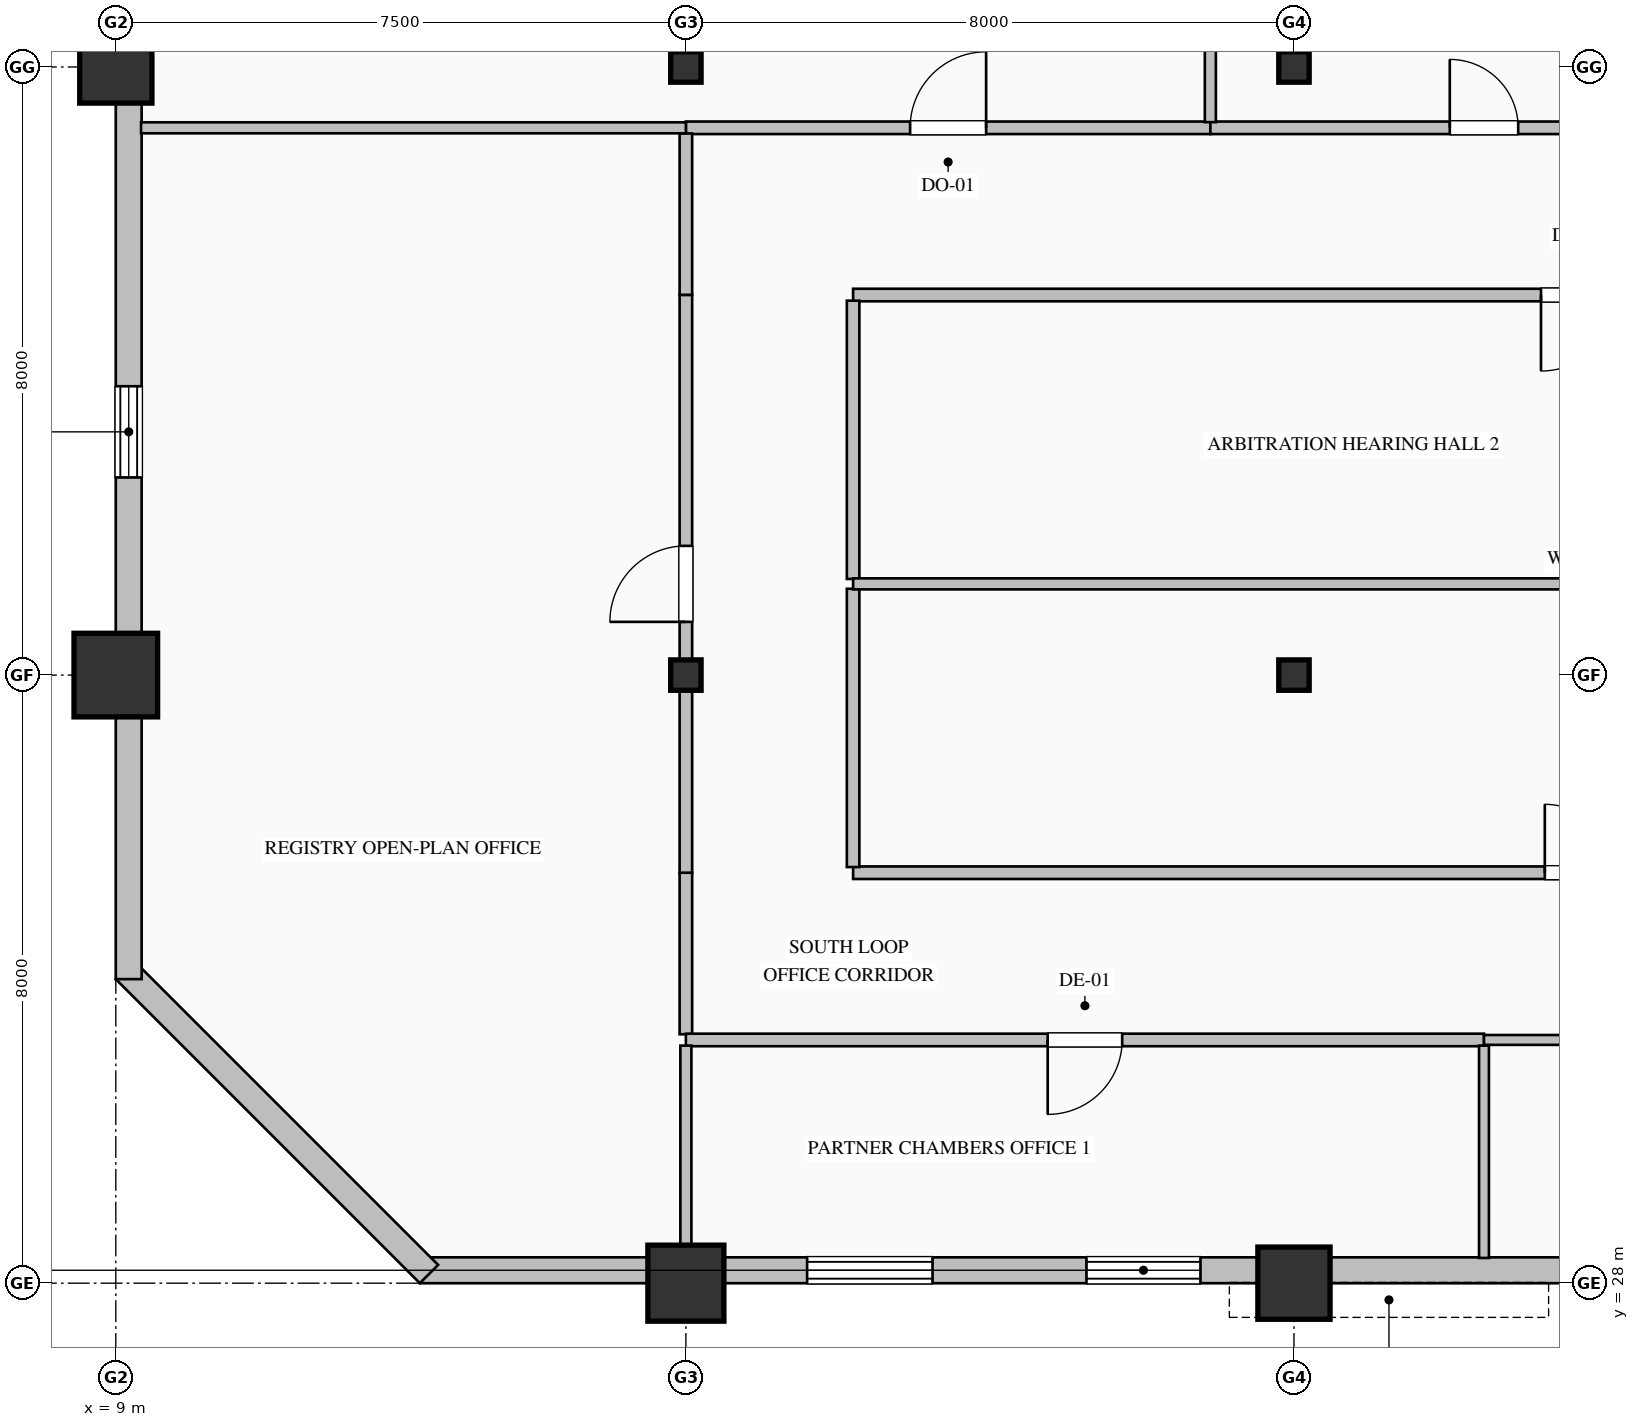
"""IFC4 building model, lengths in metres.
Left out: names, types, materials, properties, quantities, classifications, styles, units other than length and angle.
Written with IfcOpenShell. Run it as: python <this file> out.ifc"""

import sys

from ifc_helpers import new_model, si_unit, direction, frame, frame_2d, origin, origin_2d, place, context, subcontext, project, spatial, rectangle, hollow_rectangle, hollow_circle, i_section, extrude, element, fill, save


model = new_model("IFC4")
c1 = context("Model", 3, precision=1e-05, world=origin(), true_north=direction((0.0, 1.0)))
c2 = subcontext(c1, "Body", "Model", "MODEL_VIEW")
j1 = project(units=[si_unit("LENGTHUNIT", "METRE"), si_unit("PLANEANGLEUNIT", "RADIAN")], contexts=[c1])
p1 = place(None, origin())
s1 = spatial("IfcSite", under=j1, at=p1, CompositionType="ELEMENT")
p2 = place(p1, origin())
s2 = spatial("IfcBuilding", under=s1, at=p2, CompositionType="ELEMENT")
p3 = place(p2, frame((0.0, 0.0, 191.0)))
s3 = spatial("IfcBuildingStorey", under=s2, at=p3, CompositionType="ELEMENT", Elevation=191.0)
p4 = place(p3, frame((9.0, 36.0, 0.0), z_axis=(0.0, 0.0, 1.0), x_axis=(1.0, 0.0, 0.0)))
e1 = element("IfcColumn", 1, at=p4, inside=s3, PredefinedType="COLUMN", context=c2, shape_type="SweptSolid", body=[
    extrude(hollow_rectangle(XDim=1.1, YDim=1.1, WallThickness=0.04, at=origin_2d()), origin(), (0.0, 0.0, 1.0), 4.0),
])
p5 = place(p3, frame((9.0, 44.0, 0.0), z_axis=(0.0, 0.0, 1.0), x_axis=(1.0, 0.0, 0.0)))
e2 = element("IfcColumn", 2, at=p5, inside=s3, PredefinedType="COLUMN", context=c2, shape_type="SweptSolid", body=[
    extrude(hollow_rectangle(XDim=0.95, YDim=0.95, WallThickness=0.036, at=origin_2d()), origin(), (0.0, 0.0, 1.0), 4.0),
])
p6 = place(p3, frame((16.5, 28.0, 0.0), z_axis=(0.0, 0.0, 1.0), x_axis=(1.0, 0.0, 0.0)))
e3 = element("IfcColumn", 3, at=p6, inside=s3, PredefinedType="COLUMN", context=c2, shape_type="SweptSolid", body=[
    extrude(hollow_circle(Radius=0.5, WallThickness=0.036, at=origin_2d()), origin(), (0.0, 0.0, 1.0), 4.0),
])
for number, where, z_axis, x_axis in (
    (4, (16.5, 36.0, 0.0), (0.0, 0.0, 1.0), (1.0, 0.0, 0.0)),
    (5, (16.5, 44.0, 0.0), (0.0, 0.0, 1.0), (1.0, 0.0, 0.0)),
):
    element("IfcColumn", number, at=place(p3, frame(where, z_axis=z_axis, x_axis=x_axis)), inside=s3, PredefinedType="COLUMN", context=c2, shape_type="SweptSolid", body=[
        extrude(i_section(OverallWidth=0.4, OverallDepth=0.4, WebThickness=0.013, FlangeThickness=0.021, FilletRadius=0.022, at=origin_2d()), origin(), (0.0, 0.0, 1.0), 4.0),
    ])
p7 = place(p3, frame((24.5, 28.0, 0.0), z_axis=(0.0, 0.0, 1.0), x_axis=(1.0, 0.0, 0.0)))
e6 = element("IfcColumn", 6, at=p7, inside=s3, PredefinedType="COLUMN", context=c2, shape_type="SweptSolid", body=[
    extrude(hollow_rectangle(XDim=0.95, YDim=0.95, WallThickness=0.036, at=origin_2d()), origin(), (0.0, 0.0, 1.0), 4.0),
])
for number, where, z_axis, x_axis in (
    (7, (24.5, 36.0, 0.0), (0.0, 0.0, 1.0), (1.0, 0.0, 0.0)),
    (8, (24.5, 44.0, 0.0), (0.0, 0.0, 1.0), (1.0, 0.0, 0.0)),
):
    element("IfcColumn", number, at=place(p3, frame(where, z_axis=z_axis, x_axis=x_axis)), inside=s3, PredefinedType="COLUMN", context=c2, shape_type="SweptSolid", body=[
        extrude(i_section(OverallWidth=0.4, OverallDepth=0.4, WebThickness=0.013, FlangeThickness=0.021, FilletRadius=0.022, at=origin_2d()), origin(), (0.0, 0.0, 1.0), 4.0),
    ])
p8 = place(p3, frame((40.52, 28.17, 0.0), z_axis=(0.0, 0.0, 1.0), x_axis=(-1.0, 0.0, 0.0)))
e9 = element("IfcWall", 9, at=p8, inside=s3, PredefinedType="SOLIDWALL", context=c2, shape_type="SweptSolid", body=[
    extrude(rectangle(XDim=27.52, YDim=0.34, at=frame_2d((13.76, 0.0))), origin(), (0.0, 0.0, 1.0), 3.05),
])
p9 = place(p8, frame((9.975, 0.0, 0.85)))
e10 = element("IfcOpeningElement", 10, at=p9, cuts=e9, PredefinedType="OPENING", context=c2, shape_type="SweptSolid", body=[
    extrude(rectangle(XDim=1.65, YDim=1.95, at=frame_2d((0.825, 0.975))), frame((0.0, 0.18, 0.0), z_axis=(0.0, -1.0, 0.0), x_axis=(1.0, 0.0, 0.0)), (0.0, 0.0, 1.0), 0.36),
])
p10 = place(p8, frame((17.25, 0.0, 0.85)))
e11 = element("IfcOpeningElement", 11, at=p10, cuts=e9, PredefinedType="OPENING", context=c2, shape_type="SweptSolid", body=[
    extrude(rectangle(XDim=1.5, YDim=1.95, at=frame_2d((0.75, 0.975))), frame((0.0, 0.18, 0.0), z_axis=(0.0, -1.0, 0.0), x_axis=(1.0, 0.0, 0.0)), (0.0, 0.0, 1.0), 0.36),
])
p11 = place(p8, frame((20.775, 0.0, 0.85)))
e12 = element("IfcOpeningElement", 12, at=p11, cuts=e9, PredefinedType="OPENING", context=c2, shape_type="SweptSolid", body=[
    extrude(rectangle(XDim=1.65, YDim=1.95, at=frame_2d((0.825, 0.975))), frame((0.0, 0.18, 0.0), z_axis=(0.0, -1.0, 0.0), x_axis=(1.0, 0.0, 0.0)), (0.0, 0.0, 1.0), 0.36),
])
p12 = place(p3, frame((13.12, 28.12, 0.0), z_axis=(0.0, 0.0, 1.0), x_axis=(-0.707106781187, 0.707106781187, 0.0)))
e13 = element("IfcWall", 13, at=p12, inside=s3, PredefinedType="SOLIDWALL", context=c2, shape_type="SweptSolid", body=[
    extrude(rectangle(XDim=5.657, YDim=0.34, at=frame_2d((2.828, 0.0))), origin(), (0.0, 0.0, 1.0), 3.65),
])
p13 = place(p3, frame((9.17, 32.0, 0.0), z_axis=(0.0, 0.0, 1.0), x_axis=(0.0, 1.0, 0.0)))
e14 = element("IfcWall", 14, at=p13, inside=s3, PredefinedType="SOLIDWALL", context=c2, shape_type="SweptSolid", body=[
    extrude(rectangle(XDim=16.0, YDim=0.34, at=frame_2d((8.0, 0.0))), origin(), (0.0, 0.0, 1.0), 3.15),
])
p14 = place(p13, frame((6.6, 0.0, 0.7)))
e15 = element("IfcOpeningElement", 15, at=p14, cuts=e14, PredefinedType="OPENING", context=c2, shape_type="SweptSolid", body=[
    extrude(rectangle(XDim=1.2, YDim=1.85, at=frame_2d((0.6, 0.925))), frame((0.0, 0.18, 0.0), z_axis=(0.0, -1.0, 0.0), x_axis=(1.0, 0.0, 0.0)), (0.0, 0.0, 1.0), 0.36),
])
p15 = place(p3, frame((18.7, 33.4, 0.0), z_axis=(0.0, 0.0, 1.0), x_axis=(1.0, 0.0, 0.0)))
e16 = element("IfcWall", 16, at=p15, inside=s3, PredefinedType="PARTITIONING", context=c2, shape_type="SweptSolid", body=[
    extrude(rectangle(XDim=19.1, YDim=0.165, at=frame_2d((9.55, 0.0))), origin(), (0.0, 0.0, 1.0), 3.65),
])
p16 = place(p15, frame((9.1, 0.0, 0.0)))
e17 = element("IfcOpeningElement", 17, at=p16, cuts=e16, PredefinedType="OPENING", context=c2, shape_type="SweptSolid", body=[
    extrude(rectangle(XDim=0.9, YDim=2.15, at=frame_2d((0.45, 1.075))), frame((0.0, 0.093, 0.0), z_axis=(0.0, -1.0, 0.0), x_axis=(1.0, 0.0, 0.0)), (0.0, 0.0, 1.0), 0.185),
])
p17 = place(p3, frame((16.5, 31.274, 0.0), z_axis=(0.0, 0.0, 1.0), x_axis=(0.0, 1.0, 0.0)))
e18 = element("IfcWall", 18, at=p17, inside=s3, PredefinedType="PARTITIONING", context=c2, shape_type="SweptSolid", body=[
    extrude(rectangle(XDim=2.125, YDim=0.165, at=frame_2d((1.063, 0.0))), origin(), (0.0, 0.0, 1.0), 3.042),
])
p18 = place(p3, frame((27.0, 31.2, 0.0), z_axis=(0.0, 0.0, 1.0), x_axis=(-1.0, 0.0, 0.0)))
e19 = element("IfcWall", 19, at=p18, inside=s3, PredefinedType="PARTITIONING", context=c2, shape_type="SweptSolid", body=[
    extrude(rectangle(XDim=10.5, YDim=0.165, at=frame_2d((5.25, 0.0))), origin(), (0.0, 0.0, 1.0), 3.65),
])
p19 = place(p18, frame((4.76, 0.0, 0.0)))
e20 = element("IfcOpeningElement", 20, at=p19, cuts=e19, PredefinedType="OPENING", context=c2, shape_type="SweptSolid", body=[
    extrude(rectangle(XDim=0.98, YDim=2.25, at=frame_2d((0.49, 1.125))), frame((0.0, 0.093, 0.0), z_axis=(0.0, -1.0, 0.0), x_axis=(1.0, 0.0, 0.0)), (0.0, 0.0, 1.0), 0.185),
])
p20 = place(p3, frame((37.8, 31.2, 0.0), z_axis=(0.0, 0.0, 1.0), x_axis=(-1.0, 0.0, 0.0)))
e21 = element("IfcWall", 21, at=p20, inside=s3, PredefinedType="PARTITIONING", context=c2, shape_type="SweptSolid", body=[
    extrude(rectangle(XDim=10.8, YDim=0.13, at=frame_2d((5.4, 0.0))), origin(), (0.0, 0.0, 1.0), 3.65),
])
p21 = place(p20, frame((4.9, 0.0, 0.0)))
e22 = element("IfcOpeningElement", 22, at=p21, cuts=e21, PredefinedType="OPENING", context=c2, shape_type="SweptSolid", body=[
    extrude(rectangle(XDim=1.0, YDim=2.15, at=frame_2d((0.5, 1.075))), frame((0.0, 0.075, 0.0), z_axis=(0.0, -1.0, 0.0), x_axis=(1.0, 0.0, 0.0)), (0.0, 0.0, 1.0), 0.15),
])
p22 = place(p3, frame((16.5, 43.2, 0.0), z_axis=(0.0, 0.0, 1.0), x_axis=(1.0, 0.0, 0.0)))
e23 = element("IfcWall", 23, at=p22, inside=s3, PredefinedType="PARTITIONING", context=c2, shape_type="SweptSolid", body=[
    extrude(rectangle(XDim=6.9, YDim=0.165, at=frame_2d((3.45, 0.0))), origin(), (0.0, 0.0, 1.0), 3.65),
])
p23 = place(p22, frame((2.95, 0.0, 0.0)))
e24 = element("IfcOpeningElement", 24, at=p23, cuts=e23, PredefinedType="OPENING", context=c2, shape_type="SweptSolid", body=[
    extrude(rectangle(XDim=1.0, YDim=2.15, at=frame_2d((0.5, 1.075))), frame((0.0, 0.093, 0.0), z_axis=(0.0, -1.0, 0.0), x_axis=(1.0, 0.0, 0.0)), (0.0, 0.0, 1.0), 0.185),
])
p24 = place(p3, frame((23.4, 43.2, 0.0), z_axis=(0.0, 0.0, 1.0), x_axis=(1.0, 0.0, 0.0)))
e25 = element("IfcWall", 25, at=p24, inside=s3, PredefinedType="PARTITIONING", context=c2, shape_type="SweptSolid", body=[
    extrude(rectangle(XDim=7.2, YDim=0.165, at=frame_2d((3.6, 0.0))), origin(), (0.0, 0.0, 1.0), 3.65),
])
p25 = place(p24, frame((3.15, 0.0, 0.0)))
e26 = element("IfcOpeningElement", 26, at=p25, cuts=e25, PredefinedType="OPENING", context=c2, shape_type="SweptSolid", body=[
    extrude(rectangle(XDim=0.9, YDim=2.15, at=frame_2d((0.45, 1.075))), frame((0.0, 0.093, 0.0), z_axis=(0.0, -1.0, 0.0), x_axis=(1.0, 0.0, 0.0)), (0.0, 0.0, 1.0), 0.185),
])
p26 = place(p3, frame((37.8, 41.0, 0.0), z_axis=(0.0, 0.0, 1.0), x_axis=(-1.0, 0.0, 0.0)))
e27 = element("IfcWall", 27, at=p26, inside=s3, PredefinedType="PARTITIONING", context=c2, shape_type="SweptSolid", body=[
    extrude(rectangle(XDim=19.1, YDim=0.165, at=frame_2d((9.55, 0.0))), origin(), (0.0, 0.0, 1.0), 3.65),
])
p27 = place(p26, frame((9.05, 0.0, 0.0)))
e28 = element("IfcOpeningElement", 28, at=p27, cuts=e27, PredefinedType="OPENING", context=c2, shape_type="SweptSolid", body=[
    extrude(rectangle(XDim=1.0, YDim=2.15, at=frame_2d((0.5, 1.075))), frame((0.0, 0.093, 0.0), z_axis=(0.0, -1.0, 0.0), x_axis=(1.0, 0.0, 0.0)), (0.0, 0.0, 1.0), 0.185),
])
p28 = place(p3, frame((16.5, 41.0, 0.0), z_axis=(0.0, 0.0, 1.0), x_axis=(0.0, 1.0, 0.0)))
e29 = element("IfcWall", 29, at=p28, inside=s3, PredefinedType="PARTITIONING", context=c2, shape_type="SweptSolid", body=[
    extrude(rectangle(XDim=2.125, YDim=0.165, at=frame_2d((1.063, 0.0))), origin(), (0.0, 0.0, 1.0), 3.042),
])
p29 = place(p3, frame((18.7, 37.135, 0.0), z_axis=(0.0, 0.0, 1.0), x_axis=(0.0, -1.0, 0.0)))
e30 = element("IfcWall", 30, at=p29, inside=s3, PredefinedType="PARTITIONING", context=c2, shape_type="SweptSolid", body=[
    extrude(rectangle(XDim=3.661, YDim=0.165, at=frame_2d((1.831, 0.0))), origin(), (0.0, 0.0, 1.0), 3.65),
])
p30 = place(p3, frame((18.7, 40.926, 0.0), z_axis=(0.0, 0.0, 1.0), x_axis=(0.0, -1.0, 0.0)))
e31 = element("IfcWall", 31, at=p30, inside=s3, PredefinedType="PARTITIONING", context=c2, shape_type="SweptSolid", body=[
    extrude(rectangle(XDim=3.661, YDim=0.165, at=frame_2d((1.831, 0.0))), origin(), (0.0, 0.0, 1.0), 3.65),
])
p31 = place(p3, frame((16.5, 33.4, 0.0), z_axis=(0.0, 0.0, 1.0), x_axis=(0.0, 1.0, 0.0)))
e32 = element("IfcWall", 32, at=p31, inside=s3, PredefinedType="PARTITIONING", context=c2, shape_type="SweptSolid", body=[
    extrude(rectangle(XDim=7.6, YDim=0.165, at=frame_2d((3.8, 0.0))), origin(), (0.0, 0.0, 1.0), 3.042),
])
p32 = place(p31, frame((3.3, 0.0, 0.0)))
e33 = element("IfcOpeningElement", 33, at=p32, cuts=e32, PredefinedType="OPENING", context=c2, shape_type="SweptSolid", body=[
    extrude(rectangle(XDim=1.0, YDim=2.15, at=frame_2d((0.5, 1.075))), frame((0.0, 0.093, 0.0), z_axis=(0.0, -1.0, 0.0), x_axis=(1.0, 0.0, 0.0)), (0.0, 0.0, 1.0), 0.185),
])
p33 = place(p3, frame((23.4, 51.668, 0.0), z_axis=(0.0, 0.0, 1.0), x_axis=(0.0, -1.0, 0.0)))
e34 = element("IfcWall", 34, at=p33, inside=s3, PredefinedType="PARTITIONING", context=c2, shape_type="SweptSolid", body=[
    extrude(rectangle(XDim=8.394, YDim=0.145, at=frame_2d((4.197, 0.0))), origin(), (0.0, 0.0, 1.0), 3.65),
])
p34 = place(p3, frame((16.5, 43.2, 0.0), z_axis=(0.0, 0.0, 1.0), x_axis=(-1.0, 0.0, 0.0)))
e35 = element("IfcWall", 35, at=p34, inside=s3, PredefinedType="PARTITIONING", context=c2, shape_type="SweptSolid", body=[
    extrude(rectangle(XDim=7.168, YDim=0.145, at=frame_2d((3.584, 0.0))), origin(), (0.0, 0.0, 1.0), 3.65),
])
p35 = place(p3, frame((18.7, 37.2, 0.0), z_axis=(0.0, 0.0, 1.0), x_axis=(1.0, 0.0, 0.0)))
e36 = element("IfcWall", 36, at=p35, inside=s3, PredefinedType="PARTITIONING", context=c2, shape_type="SweptSolid", body=[
    extrude(rectangle(XDim=19.1, YDim=0.145, at=frame_2d((9.55, 0.0))), origin(), (0.0, 0.0, 1.0), 3.65),
])
p36 = place(p3, frame((16.5, 31.125, 0.0), z_axis=(0.0, 0.0, 1.0), x_axis=(0.0, -1.0, 0.0)))
e37 = element("IfcWall", 37, at=p36, inside=s3, PredefinedType="PARTITIONING", context=c2, shape_type="SweptSolid", body=[
    extrude(rectangle(XDim=2.793, YDim=0.145, at=frame_2d((1.397, 0.0))), origin(), (0.0, 0.0, 1.0), 3.042),
])
p37 = place(p3, frame((27.0, 31.125, 0.0), z_axis=(0.0, 0.0, 1.0), x_axis=(0.0, -1.0, 0.0)))
e38 = element("IfcWall", 38, at=p37, inside=s3, PredefinedType="PARTITIONING", context=c2, shape_type="SweptSolid", body=[
    extrude(rectangle(XDim=2.793, YDim=0.13, at=frame_2d((1.397, 0.0))), origin(), (0.0, 0.0, 1.0), 3.65),
])
p38 = place(p10, origin())
e39 = element("IfcWindow", 39, at=p38, inside=s3, PartitioningType="DOUBLE_PANEL_VERTICAL", PredefinedType="WINDOW", context=c2, shape_type="SweptSolid", body=[
    extrude(rectangle(XDim=1.5, YDim=1.95, at=frame_2d((0.75, 0.975))), frame((0.0, 0.15, 0.0), z_axis=(0.0, -1.0, 0.0), x_axis=(1.0, 0.0, 0.0)), (0.0, 0.0, 1.0), 0.06),
])
fill(e11, e39)
p39 = place(p11, origin())
e40 = element("IfcWindow", 40, at=p39, inside=s3, PartitioningType="DOUBLE_PANEL_VERTICAL", PredefinedType="WINDOW", context=c2, shape_type="SweptSolid", body=[
    extrude(rectangle(XDim=1.65, YDim=1.95, at=frame_2d((0.825, 0.975))), frame((0.0, 0.15, 0.0), z_axis=(0.0, -1.0, 0.0), x_axis=(1.0, 0.0, 0.0)), (0.0, 0.0, 1.0), 0.06),
])
fill(e12, e40)
p40 = place(p14, origin())
e41 = element("IfcWindow", 41, at=p40, inside=s3, PartitioningType="DOUBLE_PANEL_VERTICAL", PredefinedType="WINDOW", context=c2, shape_type="SweptSolid", body=[
    extrude(rectangle(XDim=1.2, YDim=1.85, at=frame_2d((0.6, 0.925))), frame((0.0, 0.15, 0.0), z_axis=(0.0, -1.0, 0.0), x_axis=(1.0, 0.0, 0.0)), (0.0, 0.0, 1.0), 0.06),
])
fill(e15, e41)
p41 = place(p23, origin())
e42 = element("IfcDoor", 42, at=p41, inside=s3, OperationType="SINGLE_SWING_RIGHT", PredefinedType="DOOR", context=c2, shape_type="SweptSolid", body=[
    extrude(rectangle(XDim=1.0, YDim=2.15, at=frame_2d((0.5, 1.075))), frame((0.0, 0.025, 0.0), z_axis=(0.0, -1.0, 0.0), x_axis=(1.0, 0.0, 0.0)), (0.0, 0.0, 1.0), 0.05),
])
fill(e24, e42)
p42 = place(p25, origin())
e43 = element("IfcDoor", 43, at=p42, inside=s3, OperationType="SINGLE_SWING_LEFT", PredefinedType="DOOR", context=c2, shape_type="SweptSolid", body=[
    extrude(rectangle(XDim=0.9, YDim=2.15, at=frame_2d((0.45, 1.075))), frame((0.0, 0.025, 0.0), z_axis=(0.0, -1.0, 0.0), x_axis=(1.0, 0.0, 0.0)), (0.0, 0.0, 1.0), 0.05),
])
fill(e26, e43)
p43 = place(p16, origin())
e44 = element("IfcDoor", 44, at=p43, inside=s3, OperationType="SINGLE_SWING_LEFT", PredefinedType="DOOR", context=c2, shape_type="SweptSolid", body=[
    extrude(rectangle(XDim=0.9, YDim=2.15, at=frame_2d((0.45, 1.075))), frame((0.0, 0.025, 0.0), z_axis=(0.0, -1.0, 0.0), x_axis=(1.0, 0.0, 0.0)), (0.0, 0.0, 1.0), 0.05),
])
fill(e17, e44)
p44 = place(p27, origin())
e45 = element("IfcDoor", 45, at=p44, inside=s3, OperationType="SINGLE_SWING_RIGHT", PredefinedType="DOOR", context=c2, shape_type="SweptSolid", body=[
    extrude(rectangle(XDim=1.0, YDim=2.15, at=frame_2d((0.5, 1.075))), frame((0.0, 0.025, 0.0), z_axis=(0.0, -1.0, 0.0), x_axis=(1.0, 0.0, 0.0)), (0.0, 0.0, 1.0), 0.05),
])
fill(e28, e45)
p45 = place(p32, origin())
e46 = element("IfcDoor", 46, at=p45, inside=s3, OperationType="SINGLE_SWING_LEFT", PredefinedType="DOOR", context=c2, shape_type="SweptSolid", body=[
    extrude(rectangle(XDim=1.0, YDim=2.15, at=frame_2d((0.5, 1.075))), frame((0.0, 0.025, 0.0), z_axis=(0.0, -1.0, 0.0), x_axis=(1.0, 0.0, 0.0)), (0.0, 0.0, 1.0), 0.05),
])
fill(e33, e46)
p46 = place(p19, origin())
e47 = element("IfcDoor", 47, at=p46, inside=s3, OperationType="SINGLE_SWING_RIGHT", PredefinedType="DOOR", context=c2, shape_type="SweptSolid", body=[
    extrude(rectangle(XDim=0.98, YDim=2.25, at=frame_2d((0.49, 1.125))), frame((0.0, 0.025, 0.0), z_axis=(0.0, -1.0, 0.0), x_axis=(1.0, 0.0, 0.0)), (0.0, 0.0, 1.0), 0.05),
])
fill(e20, e47)
save(model, sys.argv[1])
